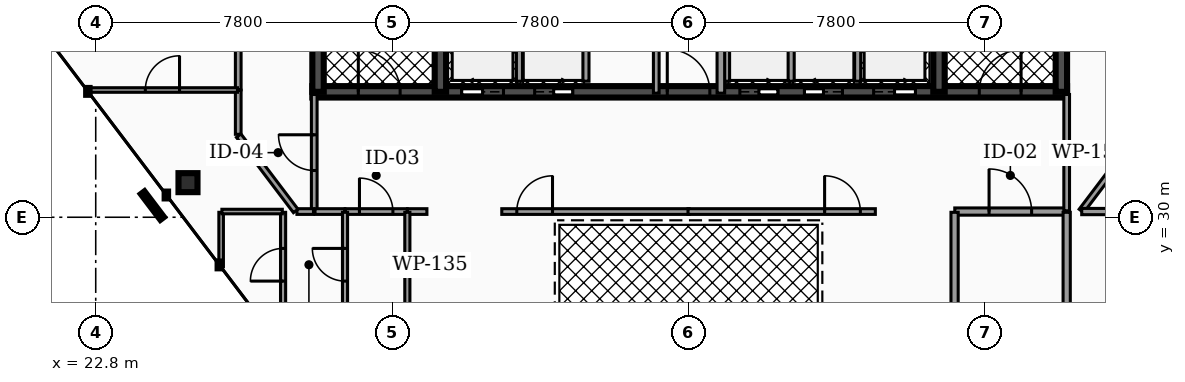
"""IFC4 building model, lengths in metres.
Left out: names, types, materials, properties, quantities, classifications, styles, units other than length and angle.
Written with IfcOpenShell. Run it as: python <this file> out.ifc"""

import sys

from ifc_helpers import new_model, si_unit, direction, frame, frame_2d, origin, origin_2d, place, context, subcontext, project, spatial, rectangle, hollow_rectangle, extrude, element, fill, save


model = new_model("IFC4")
c1 = context("Model", 3, precision=1e-05, world=origin(), true_north=direction((0.0, 1.0)))
c2 = subcontext(c1, "Body", "Model", "MODEL_VIEW")
j1 = project(units=[si_unit("LENGTHUNIT", "METRE"), si_unit("PLANEANGLEUNIT", "RADIAN")], contexts=[c1])
p1 = place(None, origin())
s1 = spatial("IfcSite", under=j1, at=p1, CompositionType="ELEMENT")
p2 = place(p1, origin())
s2 = spatial("IfcBuilding", under=s1, at=p2, CompositionType="ELEMENT")
p3 = place(p2, frame((0.0, 0.0, 265.2)))
s3 = spatial("IfcBuildingStorey", under=s2, at=p3, CompositionType="ELEMENT", Elevation=265.2)
p4 = place(p3, frame((28.5, 33.3, 0.0), z_axis=(0.0, 0.0, 1.0), x_axis=(1.0, 0.0, 0.0)))
e1 = element("IfcWall", 1, at=p4, inside=s3, PredefinedType="SHEAR", context=c2, shape_type="SweptSolid", body=[
    extrude(rectangle(XDim=19.86, YDim=0.3, at=frame_2d((9.93, 0.0))), origin(), (0.0, 0.0, 1.0), 3.18),
])
p5 = place(p4, frame((3.93, 0.0, 0.0)))
e2 = element("IfcOpeningElement", 2, at=p5, cuts=e1, PredefinedType="OPENING", context=c2, shape_type="SweptSolid", body=[
    extrude(rectangle(XDim=1.1, YDim=2.15, at=frame_2d((0.55, 1.075))), frame((0.0, 0.16, 0.0), z_axis=(0.0, -1.0, 0.0), x_axis=(1.0, 0.0, 0.0)), (0.0, 0.0, 1.0), 0.32),
])
p6 = place(p4, frame((14.77, 0.0, 0.0)))
e3 = element("IfcOpeningElement", 3, at=p6, cuts=e1, PredefinedType="OPENING", context=c2, shape_type="SweptSolid", body=[
    extrude(rectangle(XDim=1.1, YDim=2.15, at=frame_2d((0.55, 1.075))), frame((0.0, 0.16, 0.0), z_axis=(0.0, -1.0, 0.0), x_axis=(1.0, 0.0, 0.0)), (0.0, 0.0, 1.0), 0.32),
])
p7 = place(p4, frame((11.25, 0.0, 0.0)))
e4 = element("IfcOpeningElement", 4, at=p7, cuts=e1, PredefinedType="OPENING", context=c2, shape_type="SweptSolid", body=[
    extrude(rectangle(XDim=1.0, YDim=2.1, at=frame_2d((0.5, 1.05))), frame((0.0, 0.16, 0.0), z_axis=(0.0, -1.0, 0.0), x_axis=(1.0, 0.0, 0.0)), (0.0, 0.0, 1.0), 0.32),
])
p8 = place(p4, frame((12.95, 0.0, 0.0)))
e5 = element("IfcOpeningElement", 5, at=p8, cuts=e1, PredefinedType="OPENING", context=c2, shape_type="SweptSolid", body=[
    extrude(rectangle(XDim=1.0, YDim=2.1, at=frame_2d((0.5, 1.05))), frame((0.0, 0.16, 0.0), z_axis=(0.0, -1.0, 0.0), x_axis=(1.0, 0.0, 0.0)), (0.0, 0.0, 1.0), 0.32),
])
p9 = place(p4, frame((5.85, 0.0, 0.0)))
e6 = element("IfcOpeningElement", 6, at=p9, cuts=e1, PredefinedType="OPENING", context=c2, shape_type="SweptSolid", body=[
    extrude(rectangle(XDim=1.0, YDim=2.1, at=frame_2d((0.5, 1.05))), frame((0.0, 0.16, 0.0), z_axis=(0.0, -1.0, 0.0), x_axis=(1.0, 0.0, 0.0)), (0.0, 0.0, 1.0), 0.32),
])
p10 = place(p4, frame((1.21, 0.0, 0.0)))
e7 = element("IfcOpeningElement", 7, at=p10, cuts=e1, PredefinedType="OPENING", context=c2, shape_type="SweptSolid", body=[
    extrude(rectangle(XDim=1.1, YDim=2.2, at=frame_2d((0.55, 1.1))), frame((0.0, 0.16, 0.0), z_axis=(0.0, -1.0, 0.0), x_axis=(1.0, 0.0, 0.0)), (0.0, 0.0, 1.0), 0.32),
])
p11 = place(p4, frame((9.34, 0.0, 0.0)))
e8 = element("IfcOpeningElement", 8, at=p11, cuts=e1, PredefinedType="OPENING", context=c2, shape_type="SweptSolid", body=[
    extrude(rectangle(XDim=1.12, YDim=2.05, at=frame_2d((0.56, 1.025))), frame((0.0, 0.16, 0.0), z_axis=(0.0, -1.0, 0.0), x_axis=(1.0, 0.0, 0.0)), (0.0, 0.0, 1.0), 0.32),
])
p12 = place(p4, frame((17.55, 0.0, 0.0)))
e9 = element("IfcOpeningElement", 9, at=p12, cuts=e1, PredefinedType="OPENING", context=c2, shape_type="SweptSolid", body=[
    extrude(rectangle(XDim=1.1, YDim=2.2, at=frame_2d((0.55, 1.1))), frame((0.0, 0.16, 0.0), z_axis=(0.0, -1.0, 0.0), x_axis=(1.0, 0.0, 0.0)), (0.0, 0.0, 1.0), 0.32),
])
for number, where, z_axis, x_axis in (
    (10, (28.65, 33.3, 0.0), (0.0, 0.0, 1.0), (0.0, 1.0, 0.0)),
    (11, (31.87, 33.3, 0.0), (0.0, 0.0, 1.0), (0.0, 1.0, 0.0)),
    (12, (44.99, 33.3, 0.0), (0.0, 0.0, 1.0), (0.0, 1.0, 0.0)),
    (13, (48.21, 33.3, 0.0), (0.0, 0.0, 1.0), (0.0, 1.0, 0.0)),
):
    element("IfcWall", number, at=place(p3, frame(where, z_axis=z_axis, x_axis=x_axis)), inside=s3, PredefinedType="SHEAR", context=c2, shape_type="SweptSolid", body=[
        extrude(rectangle(XDim=10.1, YDim=0.3, at=frame_2d((5.05, 0.0))), origin(), (0.0, 0.0, 1.0), 3.18),
    ])
p13 = place(p3, frame((25.228, 30.91, 0.0), z_axis=(0.069456860096, 0.124399212229, 0.989798252465), x_axis=(-0.873123790234, 0.487498560949, 0.0)))
e14 = element("IfcColumn", 14, at=p13, inside=s3, PredefinedType="COLUMN", context=c2, shape_type="SweptSolid", body=[
    extrude(hollow_rectangle(XDim=0.5, YDim=0.5, WallThickness=0.025, at=origin_2d()), origin(), (0.0, 0.0, 1.0), 3.213),
])
for number, where, z_axis, x_axis in (
    (15, (33.95, 33.58, 0.0), (0.0, 0.0, 1.0), (0.0, 1.0, 0.0)),
    (16, (42.85, 33.58, 0.0), (0.0, 0.0, 1.0), (0.0, 1.0, 0.0)),
):
    element("IfcWall", number, at=place(p3, frame(where, z_axis=z_axis, x_axis=x_axis)), inside=s3, PredefinedType="SOLIDWALL", context=c2, shape_type="SweptSolid", body=[
        extrude(rectangle(XDim=2.45, YDim=0.16, at=frame_2d((1.225, 0.0))), origin(), (0.0, 0.0, 1.0), 3.18),
    ])
for number, where, z_axis, x_axis in (
    (17, (39.4, 33.58, 0.0), (0.0, 0.0, 1.0), (0.0, 1.0, 0.0)),
    (18, (41.1, 33.58, 0.0), (0.0, 0.0, 1.0), (0.0, 1.0, 0.0)),
    (19, (35.7, 33.58, 0.0), (0.0, 0.0, 1.0), (0.0, 1.0, 0.0)),
):
    element("IfcWall", number, at=place(p3, frame(where, z_axis=z_axis, x_axis=x_axis)), inside=s3, PredefinedType="SOLIDWALL", context=c2, shape_type="SweptSolid", body=[
        extrude(rectangle(XDim=2.25, YDim=0.16, at=frame_2d((1.125, 0.0))), origin(), (0.0, 0.0, 1.0), 3.18),
    ])
p14 = place(p3, frame((37.55, 33.265, 0.0), z_axis=(0.0, 0.0, 1.0), x_axis=(0.0, 1.0, 0.0)))
e20 = element("IfcWall", 20, at=p14, inside=s3, PredefinedType="PARTITIONING", context=c2, shape_type="SweptSolid", body=[
    extrude(rectangle(XDim=3.615, YDim=0.15, at=frame_2d((1.808, 0.0))), origin(), (0.0, 0.0, 1.0), 2.235),
])
p15 = place(p14, frame((1.337, 0.0, 0.0)))
e21 = element("IfcOpeningElement", 21, at=p15, cuts=e20, PredefinedType="OPENING", context=c2, shape_type="SweptSolid", body=[
    extrude(rectangle(XDim=0.94, YDim=2.05, at=frame_2d((0.47, 1.025))), frame((0.0, 0.085, 0.0), z_axis=(0.0, -1.0, 0.0), x_axis=(1.0, 0.0, 0.0)), (0.0, 0.0, 1.0), 0.17),
])
p16 = place(p3, frame((39.25, 33.265, 0.0), z_axis=(0.0, 0.0, 1.0), x_axis=(0.0, 1.0, 0.0)))
e22 = element("IfcWall", 22, at=p16, inside=s3, PredefinedType="PARTITIONING", context=c2, shape_type="SweptSolid", body=[
    extrude(rectangle(XDim=3.615, YDim=0.2, at=frame_2d((1.808, 0.0))), origin(), (0.0, 0.0, 1.0), 2.235),
])
p17 = place(p3, frame((45.405, 30.15, 0.0), z_axis=(0.0, 0.0, 1.0), x_axis=(1.0, 0.0, 0.0)))
e23 = element("IfcWall", 23, at=p17, inside=s3, PredefinedType="PARTITIONING", context=c2, shape_type="SweptSolid", body=[
    extrude(rectangle(XDim=2.925, YDim=0.19, at=frame_2d((1.462, 0.0))), origin(), (0.0, 0.0, 1.0), 2.235),
])
p18 = place(p17, frame((0.903, 0.0, 0.0)))
e24 = element("IfcOpeningElement", 24, at=p18, cuts=e23, PredefinedType="OPENING", context=c2, shape_type="SweptSolid", body=[
    extrude(rectangle(XDim=1.12, YDim=2.05, at=frame_2d((0.56, 1.025))), frame((0.0, 0.105, 0.0), z_axis=(0.0, -1.0, 0.0), x_axis=(1.0, 0.0, 0.0)), (0.0, 0.0, 1.0), 0.21),
])
p19 = place(p3, frame((28.55, 30.17, 0.0), z_axis=(0.0, 0.0, 1.0), x_axis=(0.0, 1.0, 0.0)))
e25 = element("IfcWall", 25, at=p19, inside=s3, PredefinedType="PARTITIONING", context=c2, shape_type="SweptSolid", body=[
    extrude(rectangle(XDim=3.06, YDim=0.15, at=frame_2d((1.53, 0.0))), origin(), (0.0, 0.0, 1.0), 2.235),
])
p20 = place(p19, frame((1.06, 0.0, 0.0)))
e26 = element("IfcOpeningElement", 26, at=p20, cuts=e25, PredefinedType="OPENING", context=c2, shape_type="SweptSolid", body=[
    extrude(rectangle(XDim=0.94, YDim=2.05, at=frame_2d((0.47, 1.025))), frame((0.0, 0.085, 0.0), z_axis=(0.0, -1.0, 0.0), x_axis=(1.0, 0.0, 0.0)), (0.0, 0.0, 1.0), 0.17),
])
p21 = place(p3, frame((48.35, 30.17, 0.0), z_axis=(0.0, 0.0, 1.0), x_axis=(0.0, 1.0, 0.0)))
e27 = element("IfcWall", 27, at=p21, inside=s3, PredefinedType="PARTITIONING", context=c2, shape_type="SweptSolid", body=[
    extrude(rectangle(XDim=3.06, YDim=0.15, at=frame_2d((1.53, 0.0))), origin(), (0.0, 0.0, 1.0), 2.235),
])
p22 = place(p3, frame((28.57, 30.15, 0.0), z_axis=(0.0, 0.0, 1.0), x_axis=(1.0, 0.0, 0.0)))
e28 = element("IfcWall", 28, at=p22, inside=s3, PredefinedType="PARTITIONING", context=c2, shape_type="SweptSolid", body=[
    extrude(rectangle(XDim=0.785, YDim=0.15, at=frame_2d((0.393, 0.0))), origin(), (0.0, 0.0, 1.0), 2.235),
])
p23 = place(p3, frame((29.365, 30.15, 0.0), z_axis=(0.0, 0.0, 1.0), x_axis=(1.0, 0.0, 0.0)))
e29 = element("IfcWall", 29, at=p23, inside=s3, PredefinedType="PARTITIONING", context=c2, shape_type="SweptSolid", body=[
    extrude(rectangle(XDim=1.63, YDim=0.15, at=frame_2d((0.815, 0.0))), origin(), (0.0, 0.0, 1.0), 2.235),
])
p24 = place(p23, frame((0.375, 0.0, 0.0)))
e30 = element("IfcOpeningElement", 30, at=p24, cuts=e29, PredefinedType="OPENING", context=c2, shape_type="SweptSolid", body=[
    extrude(rectangle(XDim=0.88, YDim=2.05, at=frame_2d((0.44, 1.025))), frame((0.0, 0.085, 0.0), z_axis=(0.0, -1.0, 0.0), x_axis=(1.0, 0.0, 0.0)), (0.0, 0.0, 1.0), 0.17),
])
p25 = place(p3, frame((33.485, 30.15, 0.0), z_axis=(0.0, 0.0, 1.0), x_axis=(1.0, 0.0, 0.0)))
e31 = element("IfcWall", 31, at=p25, inside=s3, PredefinedType="PARTITIONING", context=c2, shape_type="SweptSolid", body=[
    extrude(rectangle(XDim=4.93, YDim=0.15, at=frame_2d((2.465, 0.0))), origin(), (0.0, 0.0, 1.0), 2.235),
])
p26 = place(p25, frame((0.395, 0.0, 0.0)))
e32 = element("IfcOpeningElement", 32, at=p26, cuts=e31, PredefinedType="OPENING", context=c2, shape_type="SweptSolid", body=[
    extrude(rectangle(XDim=0.94, YDim=2.05, at=frame_2d((0.47, 1.025))), frame((0.0, 0.085, 0.0), z_axis=(0.0, -1.0, 0.0), x_axis=(1.0, 0.0, 0.0)), (0.0, 0.0, 1.0), 0.17),
])
p27 = place(p3, frame((31.005, 30.15, 0.0), z_axis=(0.0, 0.0, 1.0), x_axis=(1.0, 0.0, 0.0)))
e33 = element("IfcWall", 33, at=p27, inside=s3, PredefinedType="PARTITIONING", context=c2, shape_type="SweptSolid", body=[
    extrude(rectangle(XDim=0.51, YDim=0.15, at=frame_2d((0.255, 0.0))), origin(), (0.0, 0.0, 1.0), 2.235),
])
p28 = place(p3, frame((38.385, 30.15, 0.0), z_axis=(0.0, 0.0, 1.0), x_axis=(1.0, 0.0, 0.0)))
e34 = element("IfcWall", 34, at=p28, inside=s3, PredefinedType="PARTITIONING", context=c2, shape_type="SweptSolid", body=[
    extrude(rectangle(XDim=4.93, YDim=0.15, at=frame_2d((2.465, 0.0))), origin(), (0.0, 0.0, 1.0), 2.235),
])
p29 = place(p28, frame((3.595, 0.0, 0.0)))
e35 = element("IfcOpeningElement", 35, at=p29, cuts=e34, PredefinedType="OPENING", context=c2, shape_type="SweptSolid", body=[
    extrude(rectangle(XDim=0.94, YDim=2.05, at=frame_2d((0.47, 1.025))), frame((0.0, 0.085, 0.0), z_axis=(0.0, -1.0, 0.0), x_axis=(1.0, 0.0, 0.0)), (0.0, 0.0, 1.0), 0.17),
])
for number, where, z_axis, x_axis in (
    (36, (45.4, 27.37, 0.0), (0.0, 0.0, 1.0), (0.0, 1.0, 0.0)),
    (37, (48.35, 27.37, 0.0), (0.0, 0.0, 1.0), (0.0, 1.0, 0.0)),
):
    element("IfcWall", number, at=place(p3, frame(where, z_axis=z_axis, x_axis=x_axis)), inside=s3, PredefinedType="PARTITIONING", context=c2, shape_type="SweptSolid", body=[
        extrude(rectangle(XDim=2.76, YDim=0.19, at=frame_2d((1.38, 0.0))), origin(), (0.0, 0.0, 1.0), 2.235),
    ])
p30 = place(p3, frame((28.094, 30.15, 0.0), z_axis=(0.0, 0.0, 1.0), x_axis=(1.0, 0.0, 0.0)))
e38 = element("IfcWall", 38, at=p30, inside=s3, PredefinedType="PARTITIONING", context=c2, shape_type="SweptSolid", body=[
    extrude(rectangle(XDim=0.436, YDim=0.15, at=frame_2d((0.218, 0.0))), origin(), (0.0, 0.0, 1.0), 2.235),
])
p31 = place(p3, frame((26.55, 33.353, 0.0), z_axis=(0.0, 0.0, 1.0), x_axis=(0.0, 1.0, 0.0)))
e39 = element("IfcWall", 39, at=p31, inside=s3, PredefinedType="PARTITIONING", context=c2, shape_type="SweptSolid", body=[
    extrude(rectangle(XDim=10.197, YDim=0.15, at=frame_2d((5.099, 0.0))), origin(), (0.0, 0.0, 1.0), 2.235),
])
p32 = place(p31, frame((4.628, 0.0, 0.0)))
e40 = element("IfcOpeningElement", 40, at=p32, cuts=e39, PredefinedType="OPENING", context=c2, shape_type="SweptSolid", body=[
    extrude(rectangle(XDim=0.94, YDim=2.05, at=frame_2d((0.47, 1.025))), frame((0.0, 0.085, 0.0), z_axis=(0.0, -1.0, 0.0), x_axis=(1.0, 0.0, 0.0)), (0.0, 0.0, 1.0), 0.17),
])
p33 = place(p3, frame((26.562, 32.146, 0.0), z_axis=(0.0, 0.0, 1.0), x_axis=(0.603891739408, -0.797066350485, 0.0)))
e41 = element("IfcWall", 41, at=p33, inside=s3, PredefinedType="PARTITIONING", context=c2, shape_type="SweptSolid", body=[
    extrude(rectangle(XDim=2.485, YDim=0.15, at=frame_2d((1.242, 0.0))), origin(), (0.0, 0.0, 1.0), 2.235),
])
p34 = place(p3, frame((26.55, 32.183, 0.0), z_axis=(0.0, 0.0, 1.0), x_axis=(0.0, 1.0, 0.0)))
e42 = element("IfcWall", 42, at=p34, inside=s3, PredefinedType="PARTITIONING", context=c2, shape_type="SweptSolid", body=[
    extrude(rectangle(XDim=1.16, YDim=0.15, at=frame_2d((0.58, 0.0))), origin(), (0.0, 0.0, 1.0), 2.235),
])
p35 = place(p3, frame((48.738, 30.166, 0.0), z_axis=(0.0, 0.0, 1.0), x_axis=(0.603839951985, 0.797105584215, 0.0)))
e43 = element("IfcWall", 43, at=p35, inside=s3, PredefinedType="PARTITIONING", context=c2, shape_type="SweptSolid", body=[
    extrude(rectangle(XDim=2.65, YDim=0.15, at=frame_2d((1.325, 0.0))), origin(), (0.0, 0.0, 1.0), 2.235),
])
p36 = place(p3, frame((29.36, 27.37, 0.0), z_axis=(0.0, 0.0, 1.0), x_axis=(0.0, 1.0, 0.0)))
e44 = element("IfcWall", 44, at=p36, inside=s3, PredefinedType="PARTITIONING", context=c2, shape_type="SweptSolid", body=[
    extrude(rectangle(XDim=2.76, YDim=0.135, at=frame_2d((1.38, 0.0))), origin(), (0.0, 0.0, 1.0), 2.235),
])
p37 = place(p36, frame((0.95, 0.0, 0.0)))
e45 = element("IfcOpeningElement", 45, at=p37, cuts=e44, PredefinedType="OPENING", context=c2, shape_type="SweptSolid", body=[
    extrude(rectangle(XDim=0.86, YDim=2.05, at=frame_2d((0.43, 1.025))), frame((0.0, 0.077, 0.0), z_axis=(0.0, -1.0, 0.0), x_axis=(1.0, 0.0, 0.0)), (0.0, 0.0, 1.0), 0.155),
])
p38 = place(p3, frame((27.73, 27.37, 0.0), z_axis=(0.0, 0.0, 1.0), x_axis=(0.0, 1.0, 0.0)))
e46 = element("IfcWall", 46, at=p38, inside=s3, PredefinedType="PARTITIONING", context=c2, shape_type="SweptSolid", body=[
    extrude(rectangle(XDim=2.76, YDim=0.135, at=frame_2d((1.38, 0.0))), origin(), (0.0, 0.0, 1.0), 2.235),
])
p39 = place(p38, frame((0.95, 0.0, 0.0)))
e47 = element("IfcOpeningElement", 47, at=p39, cuts=e46, PredefinedType="OPENING", context=c2, shape_type="SweptSolid", body=[
    extrude(rectangle(XDim=0.86, YDim=2.05, at=frame_2d((0.43, 1.025))), frame((0.0, 0.077, 0.0), z_axis=(0.0, -1.0, 0.0), x_axis=(1.0, 0.0, 0.0)), (0.0, 0.0, 1.0), 0.155),
])
p40 = place(p3, frame((31.0, 27.37, 0.0), z_axis=(0.0, 0.0, 1.0), x_axis=(0.0, 1.0, 0.0)))
e48 = element("IfcWall", 48, at=p40, inside=s3, PredefinedType="PARTITIONING", context=c2, shape_type="SweptSolid", body=[
    extrude(rectangle(XDim=2.76, YDim=0.135, at=frame_2d((1.38, 0.0))), origin(), (0.0, 0.0, 1.0), 2.235),
])
p41 = place(p3, frame((26.1, 28.698, 0.0), z_axis=(0.0, 0.0, 1.0), x_axis=(0.0, 1.0, 0.0)))
e49 = element("IfcWall", 49, at=p41, inside=s3, PredefinedType="PARTITIONING", context=c2, shape_type="SweptSolid", body=[
    extrude(rectangle(XDim=1.432, YDim=0.12, at=frame_2d((0.716, 0.0))), origin(), (0.0, 0.0, 1.0), 2.235),
])
p42 = place(p3, frame((26.12, 30.15, 0.0), z_axis=(0.0, 0.0, 1.0), x_axis=(1.0, 0.0, 0.0)))
e50 = element("IfcWall", 50, at=p42, inside=s3, PredefinedType="PARTITIONING", context=c2, shape_type="SweptSolid", body=[
    extrude(rectangle(XDim=1.59, YDim=0.12, at=frame_2d((0.795, 0.0))), origin(), (0.0, 0.0, 1.0), 2.235),
])
p43 = place(p3, frame((48.745, 30.15, 0.0), z_axis=(0.0, 0.0, 1.0), x_axis=(1.0, 0.0, 0.0)))
e51 = element("IfcWall", 51, at=p43, inside=s3, PredefinedType="PARTITIONING", context=c2, shape_type="SweptSolid", body=[
    extrude(rectangle(XDim=3.051, YDim=0.165, at=frame_2d((1.526, 0.0))), origin(), (0.0, 0.0, 1.0), 2.235),
])
p44 = place(p3, frame((22.581, 33.348, 0.0), z_axis=(0.0, 0.0, 1.0), x_axis=(1.0, 0.0, 0.0)))
e52 = element("IfcWall", 52, at=p44, inside=s3, PredefinedType="PARTITIONING", context=c2, shape_type="SweptSolid", body=[
    extrude(rectangle(XDim=3.949, YDim=0.12, at=frame_2d((1.975, 0.0))), origin(), (0.0, 0.0, 1.0), 2.235),
])
p45 = place(p44, frame((1.525, 0.0, 0.0)))
e53 = element("IfcOpeningElement", 53, at=p45, cuts=e52, PredefinedType="OPENING", context=c2, shape_type="SweptSolid", body=[
    extrude(rectangle(XDim=0.9, YDim=2.05, at=frame_2d((0.45, 1.025))), frame((0.0, 0.07, 0.0), z_axis=(0.0, -1.0, 0.0), x_axis=(1.0, 0.0, 0.0)), (0.0, 0.0, 1.0), 0.14),
])
p46 = place(p5, origin())
e54 = element("IfcDoor", 54, at=p46, inside=s3, OperationType="SLIDING_TO_LEFT", PredefinedType="DOOR", context=c2, shape_type="SweptSolid", body=[
    extrude(rectangle(XDim=1.1, YDim=2.15, at=frame_2d((0.55, 1.075))), frame((0.0, 0.025, 0.0), z_axis=(0.0, -1.0, 0.0), x_axis=(1.0, 0.0, 0.0)), (0.0, 0.0, 1.0), 0.05),
])
fill(e2, e54)
p47 = place(p6, origin())
e55 = element("IfcDoor", 55, at=p47, inside=s3, OperationType="SLIDING_TO_RIGHT", PredefinedType="DOOR", context=c2, shape_type="SweptSolid", body=[
    extrude(rectangle(XDim=1.1, YDim=2.15, at=frame_2d((0.55, 1.075))), frame((0.0, 0.025, 0.0), z_axis=(0.0, -1.0, 0.0), x_axis=(1.0, 0.0, 0.0)), (0.0, 0.0, 1.0), 0.05),
])
fill(e3, e55)
p48 = place(p7, origin())
e56 = element("IfcDoor", 56, at=p48, inside=s3, OperationType="SLIDING_TO_RIGHT", PredefinedType="DOOR", context=c2, shape_type="SweptSolid", body=[
    extrude(rectangle(XDim=1.0, YDim=2.1, at=frame_2d((0.5, 1.05))), frame((0.0, 0.025, 0.0), z_axis=(0.0, -1.0, 0.0), x_axis=(1.0, 0.0, 0.0)), (0.0, 0.0, 1.0), 0.05),
])
fill(e4, e56)
p49 = place(p8, origin())
e57 = element("IfcDoor", 57, at=p49, inside=s3, OperationType="SLIDING_TO_LEFT", PredefinedType="DOOR", context=c2, shape_type="SweptSolid", body=[
    extrude(rectangle(XDim=1.0, YDim=2.1, at=frame_2d((0.5, 1.05))), frame((0.0, 0.025, 0.0), z_axis=(0.0, -1.0, 0.0), x_axis=(1.0, 0.0, 0.0)), (0.0, 0.0, 1.0), 0.05),
])
fill(e5, e57)
p50 = place(p9, origin())
e58 = element("IfcDoor", 58, at=p50, inside=s3, OperationType="SLIDING_TO_RIGHT", PredefinedType="DOOR", context=c2, shape_type="SweptSolid", body=[
    extrude(rectangle(XDim=1.0, YDim=2.1, at=frame_2d((0.5, 1.05))), frame((0.0, 0.025, 0.0), z_axis=(0.0, -1.0, 0.0), x_axis=(1.0, 0.0, 0.0)), (0.0, 0.0, 1.0), 0.05),
])
fill(e6, e58)
p51 = place(p10, origin())
e59 = element("IfcDoor", 59, at=p51, inside=s3, OperationType="SINGLE_SWING_LEFT", PredefinedType="DOOR", context=c2, shape_type="SweptSolid", body=[
    extrude(rectangle(XDim=1.1, YDim=2.2, at=frame_2d((0.55, 1.1))), frame((0.0, 0.025, 0.0), z_axis=(0.0, -1.0, 0.0), x_axis=(1.0, 0.0, 0.0)), (0.0, 0.0, 1.0), 0.05),
])
fill(e7, e59)
p52 = place(p11, origin())
e60 = element("IfcDoor", 60, at=p52, inside=s3, OperationType="SINGLE_SWING_LEFT", PredefinedType="DOOR", context=c2, shape_type="SweptSolid", body=[
    extrude(rectangle(XDim=1.12, YDim=2.05, at=frame_2d((0.56, 1.025))), frame((0.0, 0.025, 0.0), z_axis=(0.0, -1.0, 0.0), x_axis=(1.0, 0.0, 0.0)), (0.0, 0.0, 1.0), 0.05),
])
fill(e8, e60)
p53 = place(p12, origin())
e61 = element("IfcDoor", 61, at=p53, inside=s3, OperationType="SINGLE_SWING_RIGHT", PredefinedType="DOOR", context=c2, shape_type="SweptSolid", body=[
    extrude(rectangle(XDim=1.1, YDim=2.2, at=frame_2d((0.55, 1.1))), frame((0.0, 0.025, 0.0), z_axis=(0.0, -1.0, 0.0), x_axis=(1.0, 0.0, 0.0)), (0.0, 0.0, 1.0), 0.05),
])
fill(e9, e61)
p54 = place(p18, origin())
e62 = element("IfcDoor", 62, at=p54, inside=s3, OperationType="SINGLE_SWING_LEFT", PredefinedType="DOOR", context=c2, shape_type="SweptSolid", body=[
    extrude(rectangle(XDim=1.12, YDim=2.05, at=frame_2d((0.56, 1.025))), frame((0.0, 0.025, 0.0), z_axis=(0.0, -1.0, 0.0), x_axis=(1.0, 0.0, 0.0)), (0.0, 0.0, 1.0), 0.05),
])
fill(e24, e62)
p55 = place(p20, origin())
e63 = element("IfcDoor", 63, at=p55, inside=s3, OperationType="SINGLE_SWING_RIGHT", PredefinedType="DOOR", context=c2, shape_type="SweptSolid", body=[
    extrude(rectangle(XDim=0.94, YDim=2.05, at=frame_2d((0.47, 1.025))), frame((0.0, 0.025, 0.0), z_axis=(0.0, -1.0, 0.0), x_axis=(1.0, 0.0, 0.0)), (0.0, 0.0, 1.0), 0.05),
])
fill(e26, e63)
p56 = place(p24, origin())
e64 = element("IfcDoor", 64, at=p56, inside=s3, OperationType="SINGLE_SWING_LEFT", PredefinedType="DOOR", context=c2, shape_type="SweptSolid", body=[
    extrude(rectangle(XDim=0.88, YDim=2.05, at=frame_2d((0.44, 1.025))), frame((0.0, 0.025, 0.0), z_axis=(0.0, -1.0, 0.0), x_axis=(1.0, 0.0, 0.0)), (0.0, 0.0, 1.0), 0.05),
])
fill(e30, e64)
p57 = place(p26, origin())
e65 = element("IfcDoor", 65, at=p57, inside=s3, OperationType="SINGLE_SWING_RIGHT", PredefinedType="DOOR", context=c2, shape_type="SweptSolid", body=[
    extrude(rectangle(XDim=0.94, YDim=2.05, at=frame_2d((0.47, 1.025))), frame((0.0, 0.025, 0.0), z_axis=(0.0, -1.0, 0.0), x_axis=(1.0, 0.0, 0.0)), (0.0, 0.0, 1.0), 0.05),
])
fill(e32, e65)
p58 = place(p29, origin())
e66 = element("IfcDoor", 66, at=p58, inside=s3, OperationType="SINGLE_SWING_LEFT", PredefinedType="DOOR", context=c2, shape_type="SweptSolid", body=[
    extrude(rectangle(XDim=0.94, YDim=2.05, at=frame_2d((0.47, 1.025))), frame((0.0, 0.025, 0.0), z_axis=(0.0, -1.0, 0.0), x_axis=(1.0, 0.0, 0.0)), (0.0, 0.0, 1.0), 0.05),
])
fill(e35, e66)
p59 = place(p37, origin())
e67 = element("IfcDoor", 67, at=p59, inside=s3, OperationType="SINGLE_SWING_RIGHT", PredefinedType="DOOR", context=c2, shape_type="SweptSolid", body=[
    extrude(rectangle(XDim=0.86, YDim=2.05, at=frame_2d((0.43, 1.025))), frame((0.0, 0.025, 0.0), z_axis=(0.0, -1.0, 0.0), x_axis=(1.0, 0.0, 0.0)), (0.0, 0.0, 1.0), 0.05),
])
fill(e45, e67)
p60 = place(p39, origin())
e68 = element("IfcDoor", 68, at=p60, inside=s3, OperationType="SINGLE_SWING_LEFT", PredefinedType="DOOR", context=c2, shape_type="SweptSolid", body=[
    extrude(rectangle(XDim=0.86, YDim=2.05, at=frame_2d((0.43, 1.025))), frame((0.0, 0.025, 0.0), z_axis=(0.0, -1.0, 0.0), x_axis=(1.0, 0.0, 0.0)), (0.0, 0.0, 1.0), 0.05),
])
fill(e47, e68)
p61 = place(p45, origin())
e69 = element("IfcDoor", 69, at=p61, inside=s3, OperationType="SINGLE_SWING_RIGHT", PredefinedType="DOOR", context=c2, shape_type="SweptSolid", body=[
    extrude(rectangle(XDim=0.9, YDim=2.05, at=frame_2d((0.45, 1.025))), frame((0.0, 0.025, 0.0), z_axis=(0.0, -1.0, 0.0), x_axis=(1.0, 0.0, 0.0)), (0.0, 0.0, 1.0), 0.05),
])
fill(e53, e69)
save(model, sys.argv[1])
